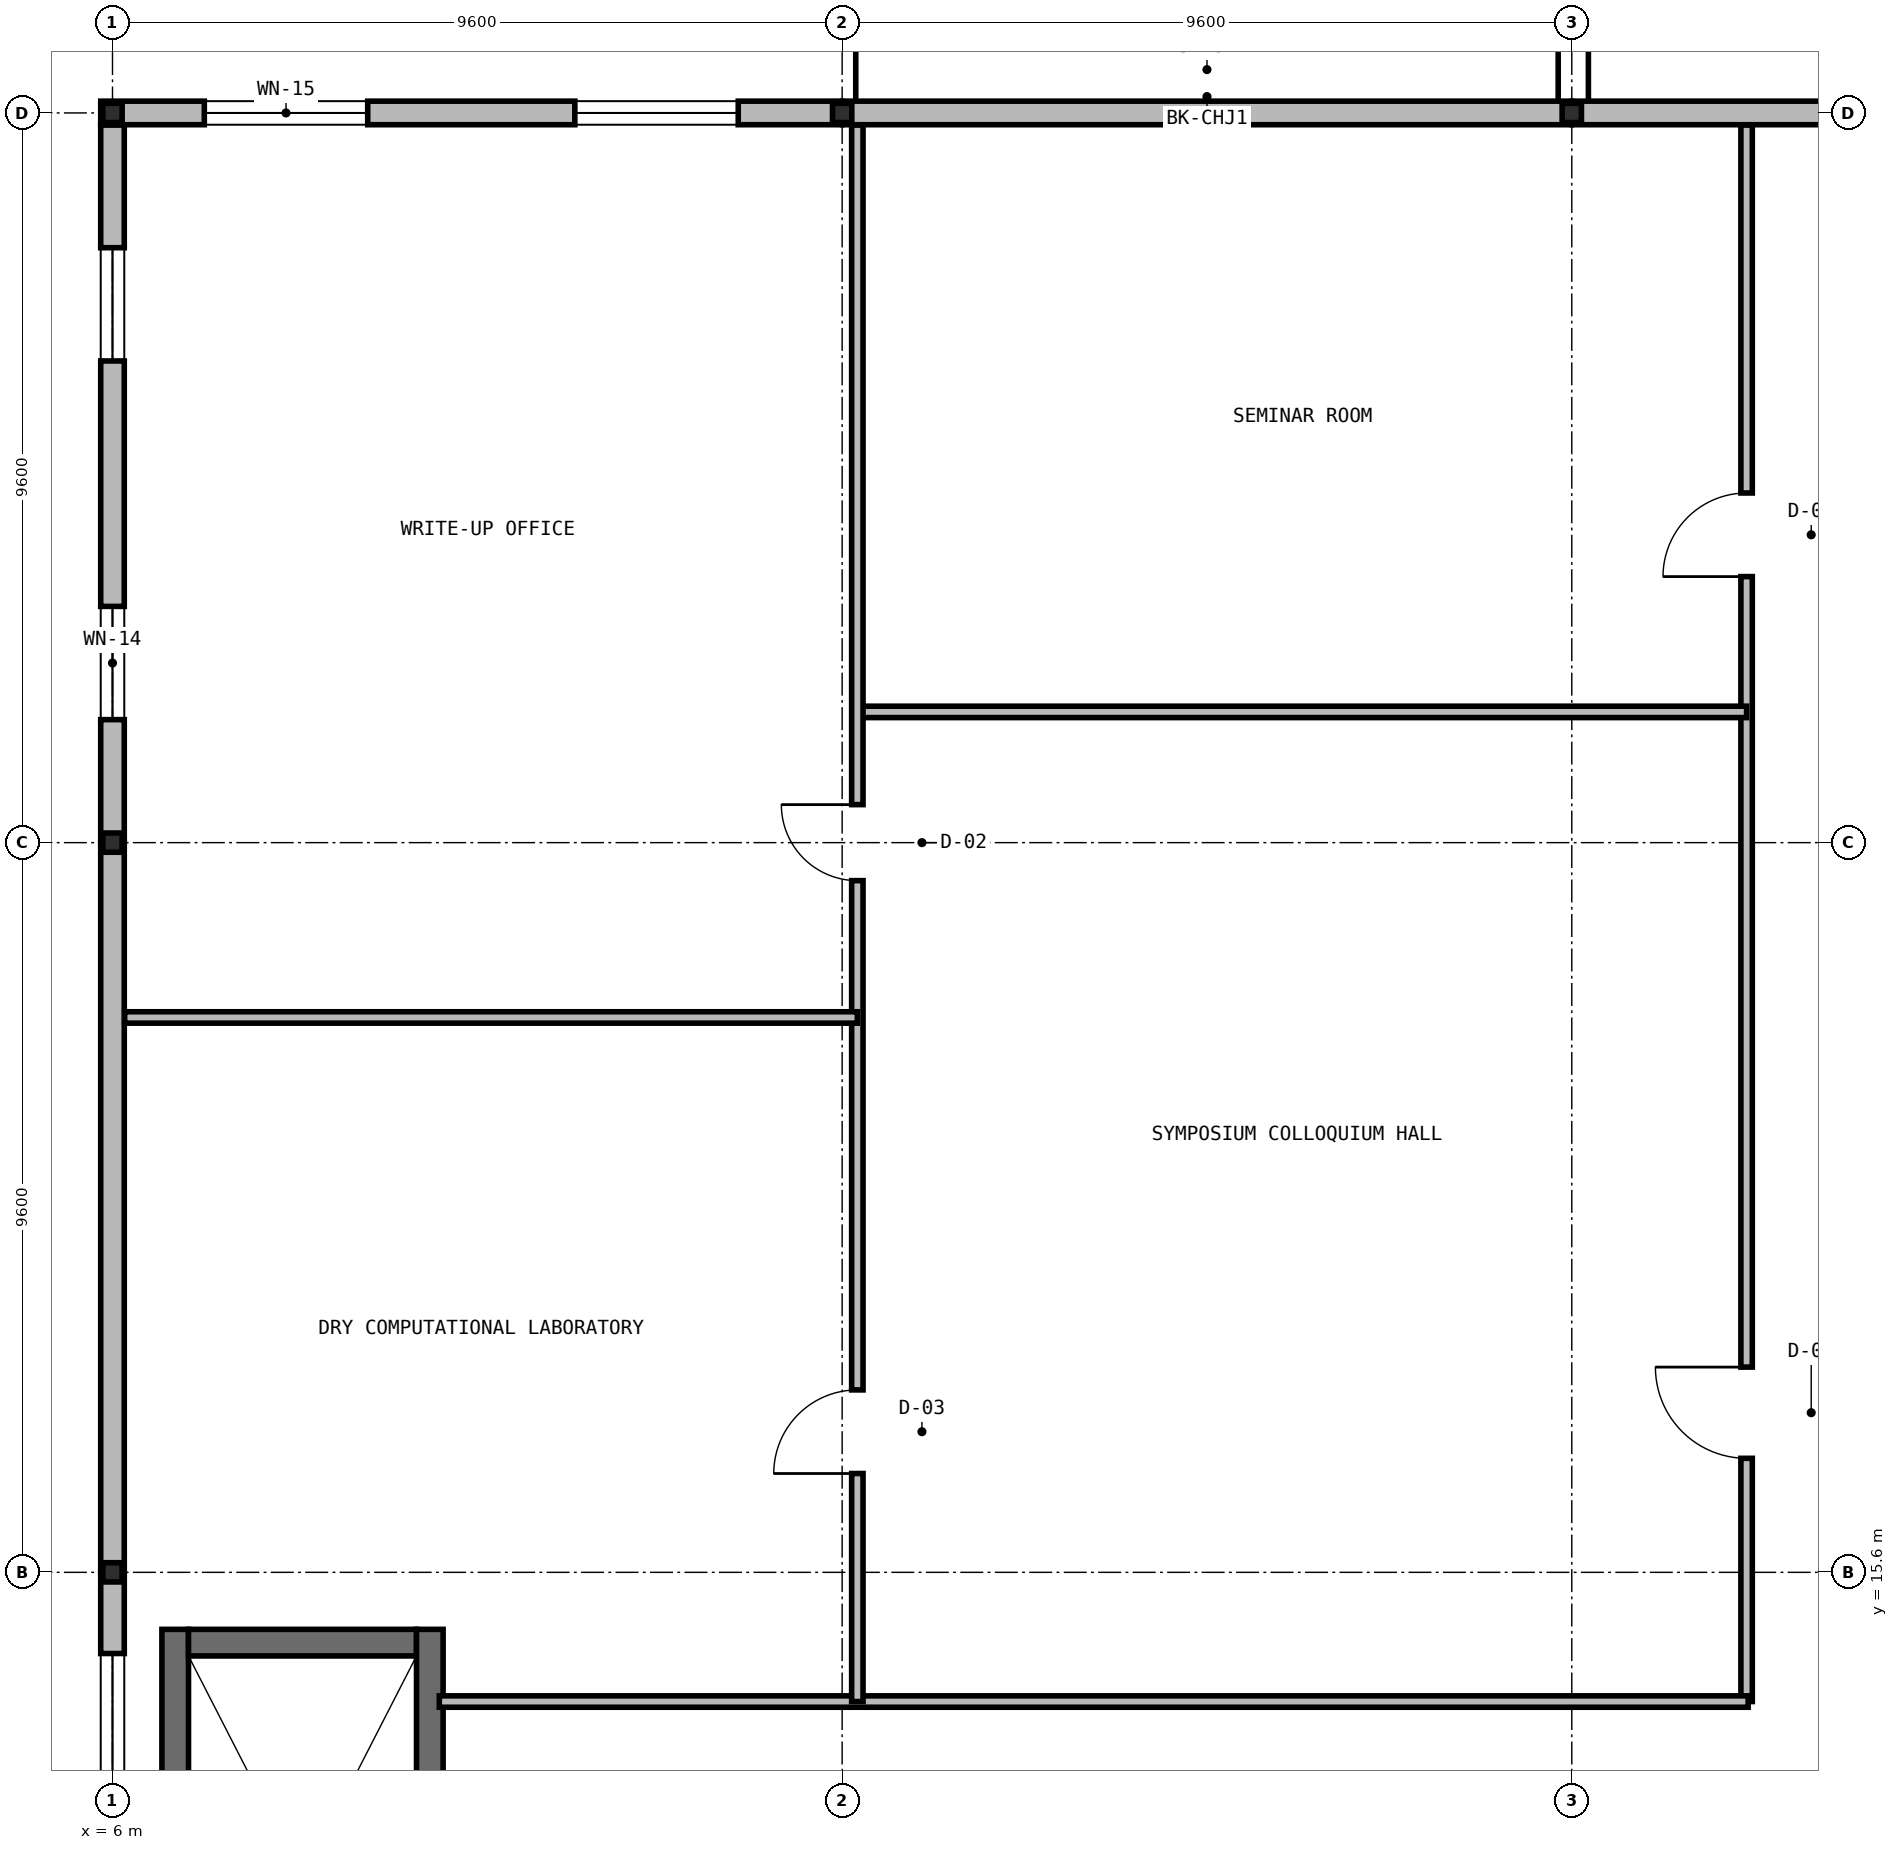
"""IFC4 building model, lengths in metres.
Left out: names, types, materials, properties, quantities, classifications, styles, units other than length and angle.
Written with IfcOpenShell. Run it as: python <this file> out.ifc"""

import sys

from ifc_helpers import new_model, si_unit, direction, frame, frame_2d, origin, origin_2d, place, context, subcontext, project, spatial, rectangle, i_section, extrude, element, fill, save


model = new_model("IFC4")
c1 = context("Model", 3, precision=1e-05, world=origin(), true_north=direction((0.0, 1.0)))
c2 = subcontext(c1, "Body", "Model", "MODEL_VIEW")
j1 = project(units=[si_unit("LENGTHUNIT", "METRE"), si_unit("PLANEANGLEUNIT", "RADIAN")], contexts=[c1])
p1 = place(None, origin())
s1 = spatial("IfcSite", under=j1, at=p1, CompositionType="ELEMENT")
p2 = place(p1, origin())
s2 = spatial("IfcBuilding", under=s1, at=p2, CompositionType="ELEMENT")
p3 = place(p2, frame((0.0, 0.0, 9.8)))
s3 = spatial("IfcBuildingStorey", under=s2, at=p3, CompositionType="ELEMENT", Elevation=9.8)
p4 = place(p3, frame((6.825, 6.65, 0.0), z_axis=(0.0, 0.0, 1.0), x_axis=(0.0, 1.0, 0.0)))
e1 = element("IfcWall", 1, at=p4, inside=s3, PredefinedType="SHEAR", context=c2, shape_type="SweptSolid", body=[
    extrude(rectangle(XDim=8.2, YDim=0.35, at=frame_2d((4.1, 0.0))), origin(), (0.0, 0.0, 1.0), 4.35),
])
p5 = place(p4, frame((0.6, 0.0, 0.0)))
e2 = element("IfcOpeningElement", 2, at=p5, cuts=e1, PredefinedType="OPENING", context=c2, shape_type="SweptSolid", body=[
    extrude(rectangle(XDim=1.1, YDim=2.15, at=frame_2d((0.55, 1.075))), frame((0.0, 0.185, 0.0), z_axis=(0.0, -1.0, 0.0), x_axis=(1.0, 0.0, 0.0)), (0.0, 0.0, 1.0), 0.37),
])
p6 = place(p3, frame((7.0, 14.675, 0.0), z_axis=(0.0, 0.0, 1.0), x_axis=(1.0, 0.0, 0.0)))
e3 = element("IfcWall", 3, at=p6, inside=s3, PredefinedType="SHEAR", context=c2, shape_type="SweptSolid", body=[
    extrude(rectangle(XDim=3.0, YDim=0.35, at=frame_2d((1.5, 0.0))), origin(), (0.0, 0.0, 1.0), 4.35),
])
p7 = place(p3, frame((10.175, 14.85, 0.0), z_axis=(0.0, 0.0, 1.0), x_axis=(0.0, -1.0, 0.0)))
e4 = element("IfcWall", 4, at=p7, inside=s3, PredefinedType="SHEAR", context=c2, shape_type="SweptSolid", body=[
    extrude(rectangle(XDim=8.2, YDim=0.35, at=frame_2d((4.1, 0.0))), origin(), (0.0, 0.0, 1.0), 4.35),
])
for number, where, z_axis, x_axis in (
    (5, (6.0, 15.6, 0.0), (0.0, 0.0, 1.0), (1.0, 0.0, 0.0)),
    (6, (6.0, 25.2, 0.0), (0.0, 0.0, 1.0), (1.0, 0.0, 0.0)),
    (7, (6.0, 34.8, 0.0), (0.0, 0.0, 1.0), (1.0, 0.0, 0.0)),
    (8, (15.6, 34.8, 0.0), (0.0, 0.0, 1.0), (1.0, 0.0, 0.0)),
    (9, (25.2, 34.8, 0.0), (0.0, 0.0, 1.0), (1.0, 0.0, 0.0)),
):
    element("IfcColumn", number, at=place(p3, frame(where, z_axis=z_axis, x_axis=x_axis)), inside=s3, PredefinedType="COLUMN", context=c2, shape_type="SweptSolid", body=[
        extrude(i_section(OverallWidth=0.254, OverallDepth=0.253, WebThickness=0.009, FlangeThickness=0.014, at=origin_2d()), origin(), (0.0, 0.0, 1.0), 4.55),
    ])
p8 = place(p3, frame((6.0, 6.159, 0.0), z_axis=(0.0, 0.0, 1.0), x_axis=(0.0, 1.0, 0.0)))
e10 = element("IfcWall", 10, at=p8, inside=s3, PredefinedType="SOLIDWALL", context=c2, shape_type="SweptSolid", body=[
    extrude(rectangle(XDim=9.437, YDim=0.31, at=frame_2d((4.719, 0.0))), origin(), (0.0, 0.0, 1.0), 4.064),
])
p9 = place(p8, frame((1.064, 0.0, 0.95)))
e11 = element("IfcOpeningElement", 11, at=p9, cuts=e10, PredefinedType="OPENING", context=c2, shape_type="SweptSolid", body=[
    extrude(rectangle(XDim=2.59, YDim=1.8, at=frame_2d((1.295, 0.9))), frame((0.0, 0.165, 0.0), z_axis=(0.0, -1.0, 0.0), x_axis=(1.0, 0.0, 0.0)), (0.0, 0.0, 1.0), 0.33),
])
p10 = place(p8, frame((5.783, 0.0, 0.95)))
e12 = element("IfcOpeningElement", 12, at=p10, cuts=e10, PredefinedType="OPENING", context=c2, shape_type="SweptSolid", body=[
    extrude(rectangle(XDim=2.59, YDim=1.8, at=frame_2d((1.295, 0.9))), frame((0.0, 0.165, 0.0), z_axis=(0.0, -1.0, 0.0), x_axis=(1.0, 0.0, 0.0)), (0.0, 0.0, 1.0), 0.33),
])
p11 = place(p3, frame((6.0, 15.604, 0.0), z_axis=(0.0, 0.0, 1.0), x_axis=(0.0, 1.0, 0.0)))
e13 = element("IfcWall", 13, at=p11, inside=s3, PredefinedType="SOLIDWALL", context=c2, shape_type="SweptSolid", body=[
    extrude(rectangle(XDim=9.592, YDim=0.31, at=frame_2d((4.796, 0.0))), origin(), (0.0, 0.0, 1.0), 4.064),
])
p12 = place(p3, frame((6.0, 25.204, 0.0), z_axis=(0.0, 0.0, 1.0), x_axis=(0.0, 1.0, 0.0)))
e14 = element("IfcWall", 14, at=p12, inside=s3, PredefinedType="SOLIDWALL", context=c2, shape_type="SweptSolid", body=[
    extrude(rectangle(XDim=9.437, YDim=0.31, at=frame_2d((4.719, 0.0))), origin(), (0.0, 0.0, 1.0), 4.064),
])
p13 = place(p12, frame((1.614, 0.0, 0.95)))
e15 = element("IfcOpeningElement", 15, at=p13, cuts=e14, PredefinedType="OPENING", context=c2, shape_type="SweptSolid", body=[
    extrude(rectangle(XDim=1.49, YDim=1.64, at=frame_2d((0.745, 0.82))), frame((0.0, 0.165, 0.0), z_axis=(0.0, -1.0, 0.0), x_axis=(1.0, 0.0, 0.0)), (0.0, 0.0, 1.0), 0.33),
])
p14 = place(p12, frame((6.333, 0.0, 0.95)))
e16 = element("IfcOpeningElement", 16, at=p14, cuts=e14, PredefinedType="OPENING", context=c2, shape_type="SweptSolid", body=[
    extrude(rectangle(XDim=1.49, YDim=1.64, at=frame_2d((0.745, 0.82))), frame((0.0, 0.165, 0.0), z_axis=(0.0, -1.0, 0.0), x_axis=(1.0, 0.0, 0.0)), (0.0, 0.0, 1.0), 0.33),
])
p15 = place(p3, frame((5.845, 34.8, 0.0), z_axis=(0.0, 0.0, 1.0), x_axis=(1.0, 0.0, 0.0)))
e17 = element("IfcWall", 17, at=p15, inside=s3, PredefinedType="SOLIDWALL", context=c2, shape_type="SweptSolid", body=[
    extrude(rectangle(XDim=9.751, YDim=0.31, at=frame_2d((4.875, 0.0))), origin(), (0.0, 0.0, 1.0), 4.064),
])
p16 = place(p15, frame((1.363, 0.0, 0.95)))
e18 = element("IfcOpeningElement", 18, at=p16, cuts=e17, PredefinedType="OPENING", context=c2, shape_type="SweptSolid", body=[
    extrude(rectangle(XDim=2.15, YDim=1.48, at=frame_2d((1.075, 0.74))), frame((0.0, 0.165, 0.0), z_axis=(0.0, -1.0, 0.0), x_axis=(1.0, 0.0, 0.0)), (0.0, 0.0, 1.0), 0.33),
])
p17 = place(p15, frame((6.238, 0.0, 0.95)))
e19 = element("IfcOpeningElement", 19, at=p17, cuts=e17, PredefinedType="OPENING", context=c2, shape_type="SweptSolid", body=[
    extrude(rectangle(XDim=2.15, YDim=1.48, at=frame_2d((1.075, 0.74))), frame((0.0, 0.165, 0.0), z_axis=(0.0, -1.0, 0.0), x_axis=(1.0, 0.0, 0.0)), (0.0, 0.0, 1.0), 0.33),
])
p18 = place(p3, frame((15.604, 34.8, 0.0), z_axis=(0.0, 0.0, 1.0), x_axis=(1.0, 0.0, 0.0)))
e20 = element("IfcWall", 20, at=p18, inside=s3, PredefinedType="SOLIDWALL", context=c2, shape_type="SweptSolid", body=[
    extrude(rectangle(XDim=9.592, YDim=0.31, at=frame_2d((4.796, 0.0))), origin(), (0.0, 0.0, 1.0), 4.064),
])
p19 = place(p3, frame((25.204, 34.8, 0.0), z_axis=(0.0, 0.0, 1.0), x_axis=(1.0, 0.0, 0.0)))
e21 = element("IfcWall", 21, at=p19, inside=s3, PredefinedType="SOLIDWALL", context=c2, shape_type="SweptSolid", body=[
    extrude(rectangle(XDim=9.751, YDim=0.31, at=frame_2d((4.875, 0.0))), origin(), (0.0, 0.0, 1.0), 4.064),
])
p20 = place(p19, frame((6.788, 0.0, 0.95)))
e22 = element("IfcOpeningElement", 22, at=p20, cuts=e21, PredefinedType="OPENING", context=c2, shape_type="SweptSolid", body=[
    extrude(rectangle(XDim=1.05, YDim=1.8, at=frame_2d((0.525, 0.9))), frame((0.0, 0.165, 0.0), z_axis=(0.0, -1.0, 0.0), x_axis=(1.0, 0.0, 0.0)), (0.0, 0.0, 1.0), 0.33),
])
p21 = place(p3, frame((27.5, 13.9, 0.0), z_axis=(0.0, 0.0, 1.0), x_axis=(0.0, 1.0, 0.0)))
e23 = element("IfcWall", 23, at=p21, inside=s3, PredefinedType="PARTITIONING", context=c2, shape_type="SweptSolid", body=[
    extrude(rectangle(XDim=20.74, YDim=0.15, at=frame_2d((10.37, 0.0))), origin(), (0.0, 0.0, 1.0), 4.3),
])
p22 = place(p21, frame((3.2, 0.0, 0.0)))
e24 = element("IfcOpeningElement", 24, at=p22, cuts=e23, PredefinedType="OPENING", context=c2, shape_type="SweptSolid", body=[
    extrude(rectangle(XDim=1.2, YDim=2.2, at=frame_2d((0.6, 1.1))), frame((0.0, 0.085, 0.0), z_axis=(0.0, -1.0, 0.0), x_axis=(1.0, 0.0, 0.0)), (0.0, 0.0, 1.0), 0.17),
])
p23 = place(p21, frame((14.8, 0.0, 0.0)))
e25 = element("IfcOpeningElement", 25, at=p23, cuts=e23, PredefinedType="OPENING", context=c2, shape_type="SweptSolid", body=[
    extrude(rectangle(XDim=1.1, YDim=2.2, at=frame_2d((0.55, 1.1))), frame((0.0, 0.085, 0.0), z_axis=(0.0, -1.0, 0.0), x_axis=(1.0, 0.0, 0.0)), (0.0, 0.0, 1.0), 0.17),
])
p24 = place(p3, frame((10.3, 13.9, 0.0), z_axis=(0.0, 0.0, 1.0), x_axis=(1.0, 0.0, 0.0)))
e26 = element("IfcWall", 26, at=p24, inside=s3, PredefinedType="PARTITIONING", context=c2, shape_type="SweptSolid", body=[
    extrude(rectangle(XDim=17.22, YDim=0.15, at=frame_2d((8.61, 0.0))), origin(), (0.0, 0.0, 1.0), 4.3),
])
p25 = place(p3, frame((15.8, 26.92, 0.0), z_axis=(0.0, 0.0, 1.0), x_axis=(1.0, 0.0, 0.0)))
e27 = element("IfcWall", 27, at=p25, inside=s3, PredefinedType="PARTITIONING", context=c2, shape_type="SweptSolid", body=[
    extrude(rectangle(XDim=11.7, YDim=0.15, at=frame_2d((5.85, 0.0))), origin(), (0.0, 0.0, 1.0), 4.3),
])
p26 = place(p3, frame((15.8, 13.9, 0.0), z_axis=(0.0, 0.0, 1.0), x_axis=(0.0, 1.0, 0.0)))
e28 = element("IfcWall", 28, at=p26, inside=s3, PredefinedType="PARTITIONING", context=c2, shape_type="SweptSolid", body=[
    extrude(rectangle(XDim=20.74, YDim=0.15, at=frame_2d((10.37, 0.0))), origin(), (0.0, 0.0, 1.0), 4.3),
])
p27 = place(p26, frame((3.0, 0.0, 0.0)))
e29 = element("IfcOpeningElement", 29, at=p27, cuts=e28, PredefinedType="OPENING", context=c2, shape_type="SweptSolid", body=[
    extrude(rectangle(XDim=1.1, YDim=2.2, at=frame_2d((0.55, 1.1))), frame((0.0, 0.085, 0.0), z_axis=(0.0, -1.0, 0.0), x_axis=(1.0, 0.0, 0.0)), (0.0, 0.0, 1.0), 0.17),
])
p28 = place(p26, frame((10.8, 0.0, 0.0)))
e30 = element("IfcOpeningElement", 30, at=p28, cuts=e28, PredefinedType="OPENING", context=c2, shape_type="SweptSolid", body=[
    extrude(rectangle(XDim=1.0, YDim=2.2, at=frame_2d((0.5, 1.1))), frame((0.0, 0.085, 0.0), z_axis=(0.0, -1.0, 0.0), x_axis=(1.0, 0.0, 0.0)), (0.0, 0.0, 1.0), 0.17),
])
p29 = place(p3, frame((6.16, 22.9, 0.0), z_axis=(0.0, 0.0, 1.0), x_axis=(1.0, 0.0, 0.0)))
e31 = element("IfcWall", 31, at=p29, inside=s3, PredefinedType="PARTITIONING", context=c2, shape_type="SweptSolid", body=[
    extrude(rectangle(XDim=9.64, YDim=0.15, at=frame_2d((4.82, 0.0))), origin(), (0.0, 0.0, 1.0), 4.3),
])
p30 = place(p10, origin())
e32 = element("IfcWindow", 32, at=p30, inside=s3, PartitioningType="SINGLE_PANEL", PredefinedType="WINDOW", context=c2, shape_type="SweptSolid", body=[
    extrude(rectangle(XDim=2.59, YDim=1.8, at=frame_2d((1.295, 0.9))), frame((0.0, 0.03, 0.0), z_axis=(0.0, -1.0, 0.0), x_axis=(1.0, 0.0, 0.0)), (0.0, 0.0, 1.0), 0.06),
])
fill(e12, e32)
p31 = place(p13, origin())
e33 = element("IfcWindow", 33, at=p31, inside=s3, PartitioningType="SINGLE_PANEL", PredefinedType="WINDOW", context=c2, shape_type="SweptSolid", body=[
    extrude(rectangle(XDim=1.49, YDim=1.64, at=frame_2d((0.745, 0.82))), frame((0.0, 0.03, 0.0), z_axis=(0.0, -1.0, 0.0), x_axis=(1.0, 0.0, 0.0)), (0.0, 0.0, 1.0), 0.06),
])
fill(e15, e33)
p32 = place(p14, origin())
e34 = element("IfcWindow", 34, at=p32, inside=s3, PartitioningType="SINGLE_PANEL", PredefinedType="WINDOW", context=c2, shape_type="SweptSolid", body=[
    extrude(rectangle(XDim=1.49, YDim=1.64, at=frame_2d((0.745, 0.82))), frame((0.0, 0.03, 0.0), z_axis=(0.0, -1.0, 0.0), x_axis=(1.0, 0.0, 0.0)), (0.0, 0.0, 1.0), 0.06),
])
fill(e16, e34)
p33 = place(p16, origin())
e35 = element("IfcWindow", 35, at=p33, inside=s3, PartitioningType="SINGLE_PANEL", PredefinedType="WINDOW", context=c2, shape_type="SweptSolid", body=[
    extrude(rectangle(XDim=2.15, YDim=1.48, at=frame_2d((1.075, 0.74))), frame((0.0, 0.03, 0.0), z_axis=(0.0, -1.0, 0.0), x_axis=(1.0, 0.0, 0.0)), (0.0, 0.0, 1.0), 0.06),
])
fill(e18, e35)
p34 = place(p17, origin())
e36 = element("IfcWindow", 36, at=p34, inside=s3, PartitioningType="SINGLE_PANEL", PredefinedType="WINDOW", context=c2, shape_type="SweptSolid", body=[
    extrude(rectangle(XDim=2.15, YDim=1.48, at=frame_2d((1.075, 0.74))), frame((0.0, 0.03, 0.0), z_axis=(0.0, -1.0, 0.0), x_axis=(1.0, 0.0, 0.0)), (0.0, 0.0, 1.0), 0.06),
])
fill(e19, e36)
p35 = place(p22, origin())
e37 = element("IfcDoor", 37, at=p35, inside=s3, OperationType="SINGLE_SWING_RIGHT", PredefinedType="DOOR", context=c2, shape_type="SweptSolid", body=[
    extrude(rectangle(XDim=1.2, YDim=2.2, at=frame_2d((0.6, 1.1))), frame((0.0, 0.025, 0.0), z_axis=(0.0, -1.0, 0.0), x_axis=(1.0, 0.0, 0.0)), (0.0, 0.0, 1.0), 0.05),
])
fill(e24, e37)
p36 = place(p23, origin())
e38 = element("IfcDoor", 38, at=p36, inside=s3, OperationType="SINGLE_SWING_LEFT", PredefinedType="DOOR", context=c2, shape_type="SweptSolid", body=[
    extrude(rectangle(XDim=1.1, YDim=2.2, at=frame_2d((0.55, 1.1))), frame((0.0, 0.025, 0.0), z_axis=(0.0, -1.0, 0.0), x_axis=(1.0, 0.0, 0.0)), (0.0, 0.0, 1.0), 0.05),
])
fill(e25, e38)
p37 = place(p27, origin())
e39 = element("IfcDoor", 39, at=p37, inside=s3, OperationType="SINGLE_SWING_LEFT", PredefinedType="DOOR", context=c2, shape_type="SweptSolid", body=[
    extrude(rectangle(XDim=1.1, YDim=2.2, at=frame_2d((0.55, 1.1))), frame((0.0, 0.025, 0.0), z_axis=(0.0, -1.0, 0.0), x_axis=(1.0, 0.0, 0.0)), (0.0, 0.0, 1.0), 0.05),
])
fill(e29, e39)
p38 = place(p28, origin())
e40 = element("IfcDoor", 40, at=p38, inside=s3, OperationType="SINGLE_SWING_RIGHT", PredefinedType="DOOR", context=c2, shape_type="SweptSolid", body=[
    extrude(rectangle(XDim=1.0, YDim=2.2, at=frame_2d((0.5, 1.1))), frame((0.0, 0.025, 0.0), z_axis=(0.0, -1.0, 0.0), x_axis=(1.0, 0.0, 0.0)), (0.0, 0.0, 1.0), 0.05),
])
fill(e30, e40)
save(model, sys.argv[1])
